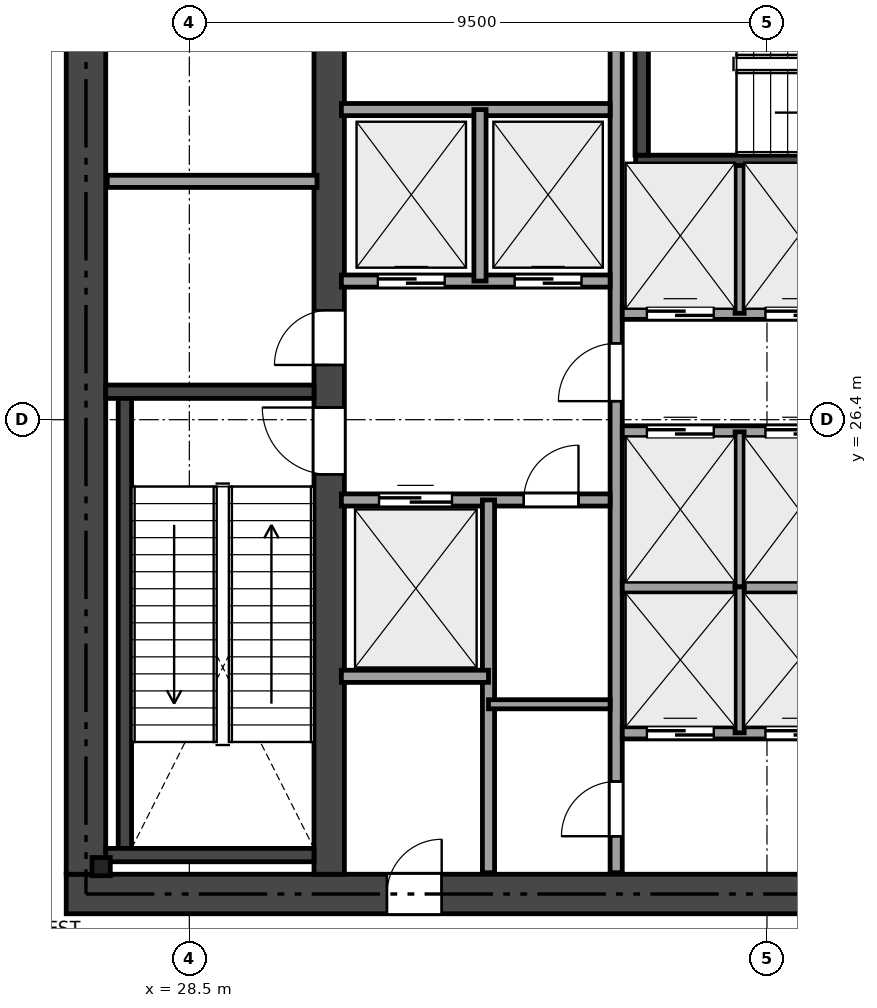
"""IFC4 building model, lengths in metres.
Left out: names, types, materials, properties, quantities, classifications, styles, units other than length and angle.
Written with IfcOpenShell. Run it as: python <this file> out.ifc"""

import sys

from ifc_helpers import new_model, si_unit, direction, frame, frame_2d, origin, origin_2d, place, context, subcontext, project, spatial, rectangle, i_section, extrude, element, fill, save


model = new_model("IFC4")
c1 = context("Model", 3, precision=1e-05, world=origin(), true_north=direction((0.0, 1.0)))
c2 = subcontext(c1, "Body", "Model", "MODEL_VIEW")
j1 = project(units=[si_unit("LENGTHUNIT", "METRE"), si_unit("PLANEANGLEUNIT", "RADIAN")], contexts=[c1])
p1 = place(None, origin())
s1 = spatial("IfcSite", under=j1, at=p1, CompositionType="ELEMENT")
p2 = place(p1, origin())
s2 = spatial("IfcBuilding", under=s1, at=p2, CompositionType="ELEMENT")
p3 = place(p2, origin())
s3 = spatial("IfcBuildingStorey", under=s2, at=p3, CompositionType="ELEMENT", Elevation=0.0)
p4 = place(p3, frame((26.475, 18.6, 0.0), z_axis=(0.0, 0.0, 1.0), x_axis=(1.0, 0.0, 0.0)))
e1 = element("IfcWall", 1, at=p4, inside=s3, PredefinedType="SHEAR", context=c2, shape_type="SweptSolid", body=[
    extrude(rectangle(XDim=21.45, YDim=0.65, at=frame_2d((10.725, 0.0))), origin(), (0.0, 0.0, 1.0), 5.05),
])
p5 = place(p4, frame((12.45, 0.0, 0.0)))
e2 = element("IfcOpeningElement", 2, at=p5, cuts=e1, PredefinedType="OPENING", context=c2, shape_type="SweptSolid", body=[
    extrude(rectangle(XDim=1.15, YDim=2.15, at=frame_2d((0.575, 1.075))), frame((0.0, 0.335, 0.0), z_axis=(0.0, -1.0, 0.0), x_axis=(1.0, 0.0, 0.0)), (0.0, 0.0, 1.0), 0.67),
])
p6 = place(p4, frame((5.275, 0.0, 0.0)))
e3 = element("IfcOpeningElement", 3, at=p6, cuts=e1, PredefinedType="OPENING", context=c2, shape_type="SweptSolid", body=[
    extrude(rectangle(XDim=0.9, YDim=2.1, at=frame_2d((0.45, 1.05))), frame((0.0, 0.335, 0.0), z_axis=(0.0, -1.0, 0.0), x_axis=(1.0, 0.0, 0.0)), (0.0, 0.0, 1.0), 0.67),
])
p7 = place(p3, frame((26.8, 18.925, 0.0), z_axis=(0.0, 0.0, 1.0), x_axis=(0.0, 1.0, 0.0)))
e4 = element("IfcWall", 4, at=p7, inside=s3, PredefinedType="SHEAR", context=c2, shape_type="SweptSolid", body=[
    extrude(rectangle(XDim=14.95, YDim=0.65, at=frame_2d((7.475, 0.0))), origin(), (0.0, 0.0, 1.0), 5.05),
])
p8 = place(p3, frame((30.8, 18.925, 0.0), z_axis=(0.0, 0.0, 1.0), x_axis=(0.0, 1.0, 0.0)))
e5 = element("IfcWall", 5, at=p8, inside=s3, PredefinedType="SHEAR", context=c2, shape_type="SweptSolid", body=[
    extrude(rectangle(XDim=14.95, YDim=0.5, at=frame_2d((7.475, 0.0))), origin(), (0.0, 0.0, 1.0), 5.05),
])
p9 = place(p8, frame((6.575, 0.0, 0.0)))
e6 = element("IfcOpeningElement", 6, at=p9, cuts=e5, PredefinedType="OPENING", context=c2, shape_type="SweptSolid", body=[
    extrude(rectangle(XDim=1.1, YDim=2.15, at=frame_2d((0.55, 1.075))), frame((0.0, 0.26, 0.0), z_axis=(0.0, -1.0, 0.0), x_axis=(1.0, 0.0, 0.0)), (0.0, 0.0, 1.0), 0.52),
])
p10 = place(p8, frame((8.375, 0.0, 0.0)))
e7 = element("IfcOpeningElement", 7, at=p10, cuts=e5, PredefinedType="OPENING", context=c2, shape_type="SweptSolid", body=[
    extrude(rectangle(XDim=0.9, YDim=2.1, at=frame_2d((0.45, 1.05))), frame((0.0, 0.26, 0.0), z_axis=(0.0, -1.0, 0.0), x_axis=(1.0, 0.0, 0.0)), (0.0, 0.0, 1.0), 0.52),
])
p11 = place(p3, frame((27.125, 26.86, 0.0), z_axis=(0.0, 0.0, 1.0), x_axis=(1.0, 0.0, 0.0)))
e8 = element("IfcWall", 8, at=p11, inside=s3, PredefinedType="SHEAR", context=c2, shape_type="SweptSolid", body=[
    extrude(rectangle(XDim=3.425, YDim=0.22, at=frame_2d((1.712, 0.0))), origin(), (0.0, 0.0, 1.0), 5.05),
])
p12 = place(p3, frame((27.44, 19.35, 0.0), z_axis=(0.0, 0.0, 1.0), x_axis=(0.0, 1.0, 0.0)))
e9 = element("IfcWall", 9, at=p12, inside=s3, PredefinedType="SHEAR", context=c2, shape_type="SweptSolid", body=[
    extrude(rectangle(XDim=7.4, YDim=0.22, at=frame_2d((3.7, 0.0))), origin(), (0.0, 0.0, 1.0), 5.05),
])
p13 = place(p3, frame((27.125, 19.24, 0.0), z_axis=(0.0, 0.0, 1.0), x_axis=(1.0, 0.0, 0.0)))
e10 = element("IfcWall", 10, at=p13, inside=s3, PredefinedType="SHEAR", context=c2, shape_type="SweptSolid", body=[
    extrude(rectangle(XDim=3.425, YDim=0.22, at=frame_2d((1.712, 0.0))), origin(), (0.0, 0.0, 1.0), 5.05),
])
p14 = place(p3, frame((35.84, 30.64, 0.0), z_axis=(0.0, 0.0, 1.0), x_axis=(1.0, 0.0, 0.0)))
e11 = element("IfcWall", 11, at=p14, inside=s3, PredefinedType="SHEAR", context=c2, shape_type="SweptSolid", body=[
    extrude(rectangle(XDim=7.61, YDim=0.22, at=frame_2d((3.805, 0.0))), origin(), (0.0, 0.0, 1.0), 5.05),
])
p15 = place(p3, frame((35.94, 30.75, 0.0), z_axis=(0.0, 0.0, 1.0), x_axis=(0.0, 1.0, 0.0)))
e12 = element("IfcWall", 12, at=p15, inside=s3, PredefinedType="SHEAR", context=c2, shape_type="SweptSolid", body=[
    extrude(rectangle(XDim=3.125, YDim=0.22, at=frame_2d((1.562, 0.0))), origin(), (0.0, 0.0, 1.0), 5.05),
])
p16 = place(p3, frame((27.05, 19.05, 0.0), z_axis=(0.0, 0.0, 1.0), x_axis=(1.0, 0.0, 0.0)))
e13 = element("IfcColumn", 13, at=p16, inside=s3, PredefinedType="PILASTER", context=c2, shape_type="SweptSolid", body=[
    extrude(i_section(OverallWidth=0.3, OverallDepth=0.3, WebThickness=0.011, FlangeThickness=0.019, at=origin_2d()), origin(), (0.0, 0.0, 1.0), 5.05),
])
p17 = place(p3, frame((27.15, 30.32, 0.0), z_axis=(0.0, 0.0, 1.0), x_axis=(1.0, 0.0, 0.0)))
e14 = element("IfcWall", 14, at=p17, inside=s3, PredefinedType="SOLIDWALL", context=c2, shape_type="SweptSolid", body=[
    extrude(rectangle(XDim=3.45, YDim=0.2, at=frame_2d((1.725, 0.0))), origin(), (0.0, 0.0, 1.0), 5.05),
])
p18 = place(p3, frame((35.52, 18.95, 0.0), z_axis=(0.0, 0.0, 1.0), x_axis=(0.0, 1.0, 0.0)))
e15 = element("IfcWall", 15, at=p18, inside=s3, PredefinedType="SOLIDWALL", context=c2, shape_type="SweptSolid", body=[
    extrude(rectangle(XDim=14.9, YDim=0.2, at=frame_2d((7.45, 0.0))), origin(), (0.0, 0.0, 1.0), 4.571),
])
p19 = place(p18, frame((7.755, 0.0, 0.0)))
e16 = element("IfcOpeningElement", 16, at=p19, cuts=e15, PredefinedType="OPENING", context=c2, shape_type="SweptSolid", body=[
    extrude(rectangle(XDim=0.95, YDim=2.15, at=frame_2d((0.475, 1.075))), frame((0.0, 0.11, 0.0), z_axis=(0.0, -1.0, 0.0), x_axis=(1.0, 0.0, 0.0)), (0.0, 0.0, 1.0), 0.22),
])
p20 = place(p18, frame((0.6, 0.0, 0.0)))
e17 = element("IfcOpeningElement", 17, at=p20, cuts=e15, PredefinedType="OPENING", context=c2, shape_type="SweptSolid", body=[
    extrude(rectangle(XDim=0.9, YDim=2.1, at=frame_2d((0.45, 1.05))), frame((0.0, 0.11, 0.0), z_axis=(0.0, -1.0, 0.0), x_axis=(1.0, 0.0, 0.0)), (0.0, 0.0, 1.0), 0.22),
])
p21 = place(p3, frame((31.0, 28.68, 0.0), z_axis=(0.0, 0.0, 1.0), x_axis=(1.0, 0.0, 0.0)))
e18 = element("IfcWall", 18, at=p21, inside=s3, PredefinedType="SOLIDWALL", context=c2, shape_type="SweptSolid", body=[
    extrude(rectangle(XDim=4.42, YDim=0.2, at=frame_2d((2.21, 0.0))), origin(), (0.0, 0.0, 1.0), 5.05),
])
p22 = place(p21, frame((0.6, 0.0, 0.0)))
e19 = element("IfcOpeningElement", 19, at=p22, cuts=e18, PredefinedType="OPENING", context=c2, shape_type="SweptSolid", body=[
    extrude(rectangle(XDim=1.1, YDim=2.15, at=frame_2d((0.55, 1.075))), frame((0.0, 0.11, 0.0), z_axis=(0.0, -1.0, 0.0), x_axis=(1.0, 0.0, 0.0)), (0.0, 0.0, 1.0), 0.22),
])
p23 = place(p21, frame((2.85, 0.0, 0.0)))
e20 = element("IfcOpeningElement", 20, at=p23, cuts=e18, PredefinedType="OPENING", context=c2, shape_type="SweptSolid", body=[
    extrude(rectangle(XDim=1.1, YDim=2.15, at=frame_2d((0.55, 1.075))), frame((0.0, 0.11, 0.0), z_axis=(0.0, -1.0, 0.0), x_axis=(1.0, 0.0, 0.0)), (0.0, 0.0, 1.0), 0.22),
])
p24 = place(p3, frame((31.0, 31.5, 0.0), z_axis=(0.0, 0.0, 1.0), x_axis=(1.0, 0.0, 0.0)))
e21 = element("IfcWall", 21, at=p24, inside=s3, PredefinedType="SOLIDWALL", context=c2, shape_type="SweptSolid", body=[
    extrude(rectangle(XDim=4.42, YDim=0.2, at=frame_2d((2.21, 0.0))), origin(), (0.0, 0.0, 1.0), 5.05),
])
p25 = place(p3, frame((33.28, 28.68, 0.0), z_axis=(0.0, 0.0, 1.0), x_axis=(0.0, 1.0, 0.0)))
e22 = element("IfcWall", 22, at=p25, inside=s3, PredefinedType="SOLIDWALL", context=c2, shape_type="SweptSolid", body=[
    extrude(rectangle(XDim=2.82, YDim=0.2, at=frame_2d((1.41, 0.0))), origin(), (0.0, 0.0, 1.0), 5.05),
])
p26 = place(p3, frame((31.0, 25.08, 0.0), z_axis=(0.0, 0.0, 1.0), x_axis=(1.0, 0.0, 0.0)))
e23 = element("IfcWall", 23, at=p26, inside=s3, PredefinedType="SOLIDWALL", context=c2, shape_type="SweptSolid", body=[
    extrude(rectangle(XDim=4.42, YDim=0.2, at=frame_2d((2.21, 0.0))), origin(), (0.0, 0.0, 1.0), 5.05),
])
p27 = place(p26, frame((3.0, 0.0, 0.0)))
e24 = element("IfcOpeningElement", 24, at=p27, cuts=e23, PredefinedType="OPENING", context=c2, shape_type="SweptSolid", body=[
    extrude(rectangle(XDim=0.9, YDim=2.1, at=frame_2d((0.45, 1.05))), frame((0.0, 0.11, 0.0), z_axis=(0.0, -1.0, 0.0), x_axis=(1.0, 0.0, 0.0)), (0.0, 0.0, 1.0), 0.22),
])
p28 = place(p26, frame((0.62, 0.0, 0.0)))
e25 = element("IfcOpeningElement", 25, at=p28, cuts=e23, PredefinedType="OPENING", context=c2, shape_type="SweptSolid", body=[
    extrude(rectangle(XDim=1.2, YDim=2.15, at=frame_2d((0.6, 1.075))), frame((0.0, 0.11, 0.0), z_axis=(0.0, -1.0, 0.0), x_axis=(1.0, 0.0, 0.0)), (0.0, 0.0, 1.0), 0.22),
])
p29 = place(p3, frame((33.42, 18.95, 0.0), z_axis=(0.0, 0.0, 1.0), x_axis=(0.0, 1.0, 0.0)))
e26 = element("IfcWall", 26, at=p29, inside=s3, PredefinedType="SOLIDWALL", context=c2, shape_type="SweptSolid", body=[
    extrude(rectangle(XDim=6.13, YDim=0.2, at=frame_2d((3.065, 0.0))), origin(), (0.0, 0.0, 1.0), 4.571),
])
p30 = place(p3, frame((31.0, 22.18, 0.0), z_axis=(0.0, 0.0, 1.0), x_axis=(1.0, 0.0, 0.0)))
e27 = element("IfcWall", 27, at=p30, inside=s3, PredefinedType="SOLIDWALL", context=c2, shape_type="SweptSolid", body=[
    extrude(rectangle(XDim=2.42, YDim=0.2, at=frame_2d((1.21, 0.0))), origin(), (0.0, 0.0, 1.0), 5.05),
])
p31 = place(p3, frame((33.42, 21.72, 0.0), z_axis=(0.0, 0.0, 1.0), x_axis=(1.0, 0.0, 0.0)))
e28 = element("IfcWall", 28, at=p31, inside=s3, PredefinedType="PARTITIONING", context=c2, shape_type="SweptSolid", body=[
    extrude(rectangle(XDim=2.0, YDim=0.15, at=frame_2d((1.0, 0.0))), origin(), (0.0, 0.0, 1.0), 5.05),
])
p32 = place(p3, frame((35.62, 28.15, 0.0), z_axis=(0.0, 0.0, 1.0), x_axis=(1.0, 0.0, 0.0)))
e29 = element("IfcWall", 29, at=p32, inside=s3, PredefinedType="SOLIDWALL", context=c2, shape_type="SweptSolid", body=[
    extrude(rectangle(XDim=7.88, YDim=0.2, at=frame_2d((3.94, 0.0))), origin(), (0.0, 0.0, 1.0), 5.05),
])
p33 = place(p32, frame((0.405, 0.0, 0.0)))
e30 = element("IfcOpeningElement", 30, at=p33, cuts=e29, PredefinedType="OPENING", context=c2, shape_type="SweptSolid", body=[
    extrude(rectangle(XDim=1.1, YDim=2.15, at=frame_2d((0.55, 1.075))), frame((0.0, 0.11, 0.0), z_axis=(0.0, -1.0, 0.0), x_axis=(1.0, 0.0, 0.0)), (0.0, 0.0, 1.0), 0.22),
])
p34 = place(p32, frame((2.355, 0.0, 0.0)))
e31 = element("IfcOpeningElement", 31, at=p34, cuts=e29, PredefinedType="OPENING", context=c2, shape_type="SweptSolid", body=[
    extrude(rectangle(XDim=1.1, YDim=2.15, at=frame_2d((0.55, 1.075))), frame((0.0, 0.11, 0.0), z_axis=(0.0, -1.0, 0.0), x_axis=(1.0, 0.0, 0.0)), (0.0, 0.0, 1.0), 0.22),
])
p35 = place(p32, frame((4.305, 0.0, 0.0)))
e32 = element("IfcOpeningElement", 32, at=p35, cuts=e29, PredefinedType="OPENING", context=c2, shape_type="SweptSolid", body=[
    extrude(rectangle(XDim=1.1, YDim=2.15, at=frame_2d((0.55, 1.075))), frame((0.0, 0.11, 0.0), z_axis=(0.0, -1.0, 0.0), x_axis=(1.0, 0.0, 0.0)), (0.0, 0.0, 1.0), 0.22),
])
p36 = place(p32, frame((6.255, 0.0, 0.0)))
e33 = element("IfcOpeningElement", 33, at=p36, cuts=e29, PredefinedType="OPENING", context=c2, shape_type="SweptSolid", body=[
    extrude(rectangle(XDim=1.1, YDim=2.15, at=frame_2d((0.55, 1.075))), frame((0.0, 0.11, 0.0), z_axis=(0.0, -1.0, 0.0), x_axis=(1.0, 0.0, 0.0)), (0.0, 0.0, 1.0), 0.22),
])
p37 = place(p3, frame((35.62, 26.2, 0.0), z_axis=(0.0, 0.0, 1.0), x_axis=(1.0, 0.0, 0.0)))
e34 = element("IfcWall", 34, at=p37, inside=s3, PredefinedType="SOLIDWALL", context=c2, shape_type="SweptSolid", body=[
    extrude(rectangle(XDim=7.88, YDim=0.2, at=frame_2d((3.94, 0.0))), origin(), (0.0, 0.0, 1.0), 5.05),
])
p38 = place(p37, frame((0.405, 0.0, 0.0)))
e35 = element("IfcOpeningElement", 35, at=p38, cuts=e34, PredefinedType="OPENING", context=c2, shape_type="SweptSolid", body=[
    extrude(rectangle(XDim=1.1, YDim=2.15, at=frame_2d((0.55, 1.075))), frame((0.0, 0.11, 0.0), z_axis=(0.0, -1.0, 0.0), x_axis=(1.0, 0.0, 0.0)), (0.0, 0.0, 1.0), 0.22),
])
p39 = place(p37, frame((2.355, 0.0, 0.0)))
e36 = element("IfcOpeningElement", 36, at=p39, cuts=e34, PredefinedType="OPENING", context=c2, shape_type="SweptSolid", body=[
    extrude(rectangle(XDim=1.1, YDim=2.15, at=frame_2d((0.55, 1.075))), frame((0.0, 0.11, 0.0), z_axis=(0.0, -1.0, 0.0), x_axis=(1.0, 0.0, 0.0)), (0.0, 0.0, 1.0), 0.22),
])
p40 = place(p37, frame((4.305, 0.0, 0.0)))
e37 = element("IfcOpeningElement", 37, at=p40, cuts=e34, PredefinedType="OPENING", context=c2, shape_type="SweptSolid", body=[
    extrude(rectangle(XDim=1.1, YDim=2.15, at=frame_2d((0.55, 1.075))), frame((0.0, 0.11, 0.0), z_axis=(0.0, -1.0, 0.0), x_axis=(1.0, 0.0, 0.0)), (0.0, 0.0, 1.0), 0.22),
])
p41 = place(p37, frame((6.255, 0.0, 0.0)))
e38 = element("IfcOpeningElement", 38, at=p41, cuts=e34, PredefinedType="OPENING", context=c2, shape_type="SweptSolid", body=[
    extrude(rectangle(XDim=1.1, YDim=2.15, at=frame_2d((0.55, 1.075))), frame((0.0, 0.11, 0.0), z_axis=(0.0, -1.0, 0.0), x_axis=(1.0, 0.0, 0.0)), (0.0, 0.0, 1.0), 0.22),
])
p42 = place(p3, frame((35.62, 23.65, 0.0), z_axis=(0.0, 0.0, 1.0), x_axis=(1.0, 0.0, 0.0)))
e39 = element("IfcWall", 39, at=p42, inside=s3, PredefinedType="SOLIDWALL", context=c2, shape_type="SweptSolid", body=[
    extrude(rectangle(XDim=7.88, YDim=0.2, at=frame_2d((3.94, 0.0))), origin(), (0.0, 0.0, 1.0), 4.571),
])
p43 = place(p3, frame((35.62, 21.25, 0.0), z_axis=(0.0, 0.0, 1.0), x_axis=(1.0, 0.0, 0.0)))
e40 = element("IfcWall", 40, at=p43, inside=s3, PredefinedType="SOLIDWALL", context=c2, shape_type="SweptSolid", body=[
    extrude(rectangle(XDim=7.88, YDim=0.2, at=frame_2d((3.94, 0.0))), origin(), (0.0, 0.0, 1.0), 5.05),
])
p44 = place(p43, frame((0.405, 0.0, 0.0)))
e41 = element("IfcOpeningElement", 41, at=p44, cuts=e40, PredefinedType="OPENING", context=c2, shape_type="SweptSolid", body=[
    extrude(rectangle(XDim=1.1, YDim=2.15, at=frame_2d((0.55, 1.075))), frame((0.0, 0.11, 0.0), z_axis=(0.0, -1.0, 0.0), x_axis=(1.0, 0.0, 0.0)), (0.0, 0.0, 1.0), 0.22),
])
p45 = place(p43, frame((2.355, 0.0, 0.0)))
e42 = element("IfcOpeningElement", 42, at=p45, cuts=e40, PredefinedType="OPENING", context=c2, shape_type="SweptSolid", body=[
    extrude(rectangle(XDim=1.1, YDim=2.15, at=frame_2d((0.55, 1.075))), frame((0.0, 0.11, 0.0), z_axis=(0.0, -1.0, 0.0), x_axis=(1.0, 0.0, 0.0)), (0.0, 0.0, 1.0), 0.22),
])
p46 = place(p43, frame((4.305, 0.0, 0.0)))
e43 = element("IfcOpeningElement", 43, at=p46, cuts=e40, PredefinedType="OPENING", context=c2, shape_type="SweptSolid", body=[
    extrude(rectangle(XDim=1.1, YDim=2.15, at=frame_2d((0.55, 1.075))), frame((0.0, 0.11, 0.0), z_axis=(0.0, -1.0, 0.0), x_axis=(1.0, 0.0, 0.0)), (0.0, 0.0, 1.0), 0.22),
])
p47 = place(p43, frame((6.255, 0.0, 0.0)))
e44 = element("IfcOpeningElement", 44, at=p47, cuts=e40, PredefinedType="OPENING", context=c2, shape_type="SweptSolid", body=[
    extrude(rectangle(XDim=1.1, YDim=2.15, at=frame_2d((0.55, 1.075))), frame((0.0, 0.11, 0.0), z_axis=(0.0, -1.0, 0.0), x_axis=(1.0, 0.0, 0.0)), (0.0, 0.0, 1.0), 0.22),
])
p48 = place(p3, frame((37.55, 28.15, 0.0), z_axis=(0.0, 0.0, 1.0), x_axis=(0.0, 1.0, 0.0)))
e45 = element("IfcWall", 45, at=p48, inside=s3, PredefinedType="PARTITIONING", context=c2, shape_type="SweptSolid", body=[
    extrude(rectangle(XDim=2.43, YDim=0.15, at=frame_2d((1.215, 0.0))), origin(), (0.0, 0.0, 1.0), 5.05),
])
p49 = place(p3, frame((37.55, 23.65, 0.0), z_axis=(0.0, 0.0, 1.0), x_axis=(0.0, 1.0, 0.0)))
e46 = element("IfcWall", 46, at=p49, inside=s3, PredefinedType="PARTITIONING", context=c2, shape_type="SweptSolid", body=[
    extrude(rectangle(XDim=2.55, YDim=0.15, at=frame_2d((1.275, 0.0))), origin(), (0.0, 0.0, 1.0), 4.571),
])
p50 = place(p3, frame((37.55, 21.25, 0.0), z_axis=(0.0, 0.0, 1.0), x_axis=(0.0, 1.0, 0.0)))
e47 = element("IfcWall", 47, at=p50, inside=s3, PredefinedType="PARTITIONING", context=c2, shape_type="SweptSolid", body=[
    extrude(rectangle(XDim=2.4, YDim=0.15, at=frame_2d((1.2, 0.0))), origin(), (0.0, 0.0, 1.0), 4.571),
])
p51 = place(p9, origin())
e48 = element("IfcDoor", 48, at=p51, inside=s3, OperationType="SINGLE_SWING_RIGHT", PredefinedType="DOOR", context=c2, shape_type="SweptSolid", body=[
    extrude(rectangle(XDim=1.1, YDim=2.15, at=frame_2d((0.55, 1.075))), frame((0.0, 0.025, 0.0), z_axis=(0.0, -1.0, 0.0), x_axis=(1.0, 0.0, 0.0)), (0.0, 0.0, 1.0), 0.05),
])
fill(e6, e48)
p52 = place(p19, origin())
e49 = element("IfcDoor", 49, at=p52, inside=s3, OperationType="SINGLE_SWING_LEFT", PredefinedType="DOOR", context=c2, shape_type="SweptSolid", body=[
    extrude(rectangle(XDim=0.95, YDim=2.15, at=frame_2d((0.475, 1.075))), frame((0.0, 0.025, 0.0), z_axis=(0.0, -1.0, 0.0), x_axis=(1.0, 0.0, 0.0)), (0.0, 0.0, 1.0), 0.05),
])
fill(e16, e49)
p53 = place(p10, origin())
e50 = element("IfcDoor", 50, at=p53, inside=s3, OperationType="SINGLE_SWING_LEFT", PredefinedType="DOOR", context=c2, shape_type="SweptSolid", body=[
    extrude(rectangle(XDim=0.9, YDim=2.1, at=frame_2d((0.45, 1.05))), frame((0.0, 0.025, 0.0), z_axis=(0.0, -1.0, 0.0), x_axis=(1.0, 0.0, 0.0)), (0.0, 0.0, 1.0), 0.05),
])
fill(e7, e50)
p54 = place(p6, origin())
e51 = element("IfcDoor", 51, at=p54, inside=s3, OperationType="SINGLE_SWING_RIGHT", PredefinedType="DOOR", context=c2, shape_type="SweptSolid", body=[
    extrude(rectangle(XDim=0.9, YDim=2.1, at=frame_2d((0.45, 1.05))), frame((0.0, 0.025, 0.0), z_axis=(0.0, -1.0, 0.0), x_axis=(1.0, 0.0, 0.0)), (0.0, 0.0, 1.0), 0.05),
])
fill(e3, e51)
p55 = place(p20, origin())
e52 = element("IfcDoor", 52, at=p55, inside=s3, OperationType="SINGLE_SWING_LEFT", PredefinedType="DOOR", context=c2, shape_type="SweptSolid", body=[
    extrude(rectangle(XDim=0.9, YDim=2.1, at=frame_2d((0.45, 1.05))), frame((0.0, 0.025, 0.0), z_axis=(0.0, -1.0, 0.0), x_axis=(1.0, 0.0, 0.0)), (0.0, 0.0, 1.0), 0.05),
])
fill(e17, e52)
p56 = place(p27, origin())
e53 = element("IfcDoor", 53, at=p56, inside=s3, OperationType="SINGLE_SWING_RIGHT", PredefinedType="DOOR", context=c2, shape_type="SweptSolid", body=[
    extrude(rectangle(XDim=0.9, YDim=2.1, at=frame_2d((0.45, 1.05))), frame((0.0, 0.025, 0.0), z_axis=(0.0, -1.0, 0.0), x_axis=(1.0, 0.0, 0.0)), (0.0, 0.0, 1.0), 0.05),
])
fill(e24, e53)
p57 = place(p22, origin())
e54 = element("IfcDoor", 54, at=p57, inside=s3, OperationType="SLIDING_TO_LEFT", PredefinedType="DOOR", context=c2, shape_type="SweptSolid", body=[
    extrude(rectangle(XDim=1.1, YDim=2.15, at=frame_2d((0.55, 1.075))), frame((0.0, 0.025, 0.0), z_axis=(0.0, -1.0, 0.0), x_axis=(1.0, 0.0, 0.0)), (0.0, 0.0, 1.0), 0.05),
])
fill(e19, e54)
p58 = place(p23, origin())
e55 = element("IfcDoor", 55, at=p58, inside=s3, OperationType="SLIDING_TO_LEFT", PredefinedType="DOOR", context=c2, shape_type="SweptSolid", body=[
    extrude(rectangle(XDim=1.1, YDim=2.15, at=frame_2d((0.55, 1.075))), frame((0.0, 0.025, 0.0), z_axis=(0.0, -1.0, 0.0), x_axis=(1.0, 0.0, 0.0)), (0.0, 0.0, 1.0), 0.05),
])
fill(e20, e55)
p59 = place(p28, origin())
e56 = element("IfcDoor", 56, at=p59, inside=s3, OperationType="SLIDING_TO_LEFT", PredefinedType="DOOR", context=c2, shape_type="SweptSolid", body=[
    extrude(rectangle(XDim=1.2, YDim=2.15, at=frame_2d((0.6, 1.075))), frame((0.0, 0.025, 0.0), z_axis=(0.0, -1.0, 0.0), x_axis=(1.0, 0.0, 0.0)), (0.0, 0.0, 1.0), 0.05),
])
fill(e25, e56)
p60 = place(p44, origin())
e57 = element("IfcDoor", 57, at=p60, inside=s3, OperationType="SLIDING_TO_LEFT", PredefinedType="DOOR", context=c2, shape_type="SweptSolid", body=[
    extrude(rectangle(XDim=1.1, YDim=2.15, at=frame_2d((0.55, 1.075))), frame((0.0, 0.025, 0.0), z_axis=(0.0, -1.0, 0.0), x_axis=(1.0, 0.0, 0.0)), (0.0, 0.0, 1.0), 0.05),
])
fill(e41, e57)
p61 = place(p38, origin())
e58 = element("IfcDoor", 58, at=p61, inside=s3, OperationType="SLIDING_TO_LEFT", PredefinedType="DOOR", context=c2, shape_type="SweptSolid", body=[
    extrude(rectangle(XDim=1.1, YDim=2.15, at=frame_2d((0.55, 1.075))), frame((0.0, 0.025, 0.0), z_axis=(0.0, -1.0, 0.0), x_axis=(1.0, 0.0, 0.0)), (0.0, 0.0, 1.0), 0.05),
])
fill(e35, e58)
p62 = place(p33, origin())
e59 = element("IfcDoor", 59, at=p62, inside=s3, OperationType="SLIDING_TO_LEFT", PredefinedType="DOOR", context=c2, shape_type="SweptSolid", body=[
    extrude(rectangle(XDim=1.1, YDim=2.15, at=frame_2d((0.55, 1.075))), frame((0.0, 0.025, 0.0), z_axis=(0.0, -1.0, 0.0), x_axis=(1.0, 0.0, 0.0)), (0.0, 0.0, 1.0), 0.05),
])
fill(e30, e59)
p63 = place(p45, origin())
e60 = element("IfcDoor", 60, at=p63, inside=s3, OperationType="SLIDING_TO_LEFT", PredefinedType="DOOR", context=c2, shape_type="SweptSolid", body=[
    extrude(rectangle(XDim=1.1, YDim=2.15, at=frame_2d((0.55, 1.075))), frame((0.0, 0.025, 0.0), z_axis=(0.0, -1.0, 0.0), x_axis=(1.0, 0.0, 0.0)), (0.0, 0.0, 1.0), 0.05),
])
fill(e42, e60)
p64 = place(p39, origin())
e61 = element("IfcDoor", 61, at=p64, inside=s3, OperationType="SLIDING_TO_LEFT", PredefinedType="DOOR", context=c2, shape_type="SweptSolid", body=[
    extrude(rectangle(XDim=1.1, YDim=2.15, at=frame_2d((0.55, 1.075))), frame((0.0, 0.025, 0.0), z_axis=(0.0, -1.0, 0.0), x_axis=(1.0, 0.0, 0.0)), (0.0, 0.0, 1.0), 0.05),
])
fill(e36, e61)
p65 = place(p34, origin())
e62 = element("IfcDoor", 62, at=p65, inside=s3, OperationType="SLIDING_TO_LEFT", PredefinedType="DOOR", context=c2, shape_type="SweptSolid", body=[
    extrude(rectangle(XDim=1.1, YDim=2.15, at=frame_2d((0.55, 1.075))), frame((0.0, 0.025, 0.0), z_axis=(0.0, -1.0, 0.0), x_axis=(1.0, 0.0, 0.0)), (0.0, 0.0, 1.0), 0.05),
])
fill(e31, e62)
save(model, sys.argv[1])
